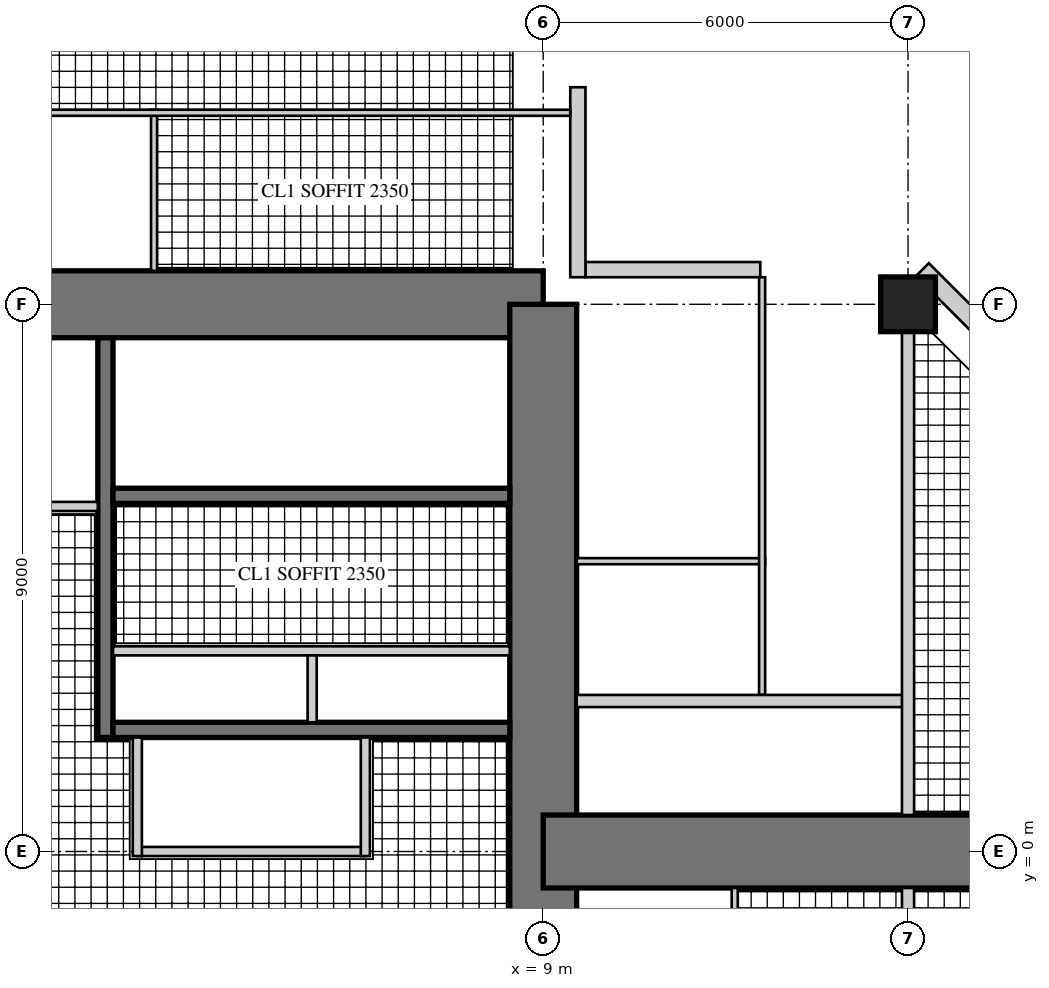
"""IFC4 building model, lengths in metres.
Left out: names, types, materials, properties, quantities, classifications, styles, units other than length and angle.
Written with IfcOpenShell. Run it as: python <this file> out.ifc"""

import sys

from ifc_helpers import new_model, si_unit, direction, frame, frame_2d, origin, origin_2d, place, context, subcontext, project, spatial, rectangle, hollow_rectangle, extrude, element, fill, save


model = new_model("IFC4")
c1 = context("Model", 3, precision=1e-05, world=origin(), true_north=direction((0.0, 1.0)))
c2 = subcontext(c1, "Body", "Model", "MODEL_VIEW")
j1 = project(units=[si_unit("LENGTHUNIT", "METRE"), si_unit("PLANEANGLEUNIT", "RADIAN")], contexts=[c1])
p1 = place(None, origin())
s1 = spatial("IfcSite", under=j1, at=p1, CompositionType="ELEMENT")
p2 = place(p1, origin())
s2 = spatial("IfcBuilding", under=s1, at=p2, CompositionType="ELEMENT")
p3 = place(p2, frame((0.0, 0.0, 179.7)))
s3 = spatial("IfcBuildingStorey", under=s2, at=p3, CompositionType="ELEMENT", Elevation=179.7)
p4 = place(p3, frame((9.0, 9.0, 0.0), z_axis=(0.0, 0.0, 1.0), x_axis=(-1.0, 0.0, 0.0)))
e1 = element("IfcWall", 1, at=p4, inside=s3, PredefinedType="SHEAR", context=c2, shape_type="SweptSolid", body=[
    extrude(rectangle(XDim=18.0, YDim=1.1, at=frame_2d((9.0, 0.0))), origin(), (0.0, 0.0, 1.0), 3.4),
])
p5 = place(p4, frame((9.8, 0.0, 0.0)))
e2 = element("IfcOpeningElement", 2, at=p5, cuts=e1, PredefinedType="OPENING", context=c2, shape_type="SweptSolid", body=[
    extrude(rectangle(XDim=1.0, YDim=2.4, at=frame_2d((0.5, 1.2))), frame((0.0, 0.56, 0.0), z_axis=(0.0, -1.0, 0.0), x_axis=(1.0, 0.0, 0.0)), (0.0, 0.0, 1.0), 1.12),
])
p6 = place(p3, frame((9.0, -9.0, 0.0), z_axis=(0.0, 0.0, 1.0), x_axis=(0.0, 1.0, 0.0)))
e3 = element("IfcWall", 3, at=p6, inside=s3, PredefinedType="SHEAR", context=c2, shape_type="SweptSolid", body=[
    extrude(rectangle(XDim=18.0, YDim=1.1, at=frame_2d((9.0, 0.0))), origin(), (0.0, 0.0, 1.0), 3.4),
])
p7 = place(p6, frame((9.8, 0.0, 0.0)))
e4 = element("IfcOpeningElement", 4, at=p7, cuts=e3, PredefinedType="OPENING", context=c2, shape_type="SweptSolid", body=[
    extrude(rectangle(XDim=1.0, YDim=2.4, at=frame_2d((0.5, 1.2))), frame((0.0, 0.56, 0.0), z_axis=(0.0, -1.0, 0.0), x_axis=(1.0, 0.0, 0.0)), (0.0, 0.0, 1.0), 1.12),
])
p8 = place(p3, frame((1.8, 1.875, 0.0), z_axis=(0.0, 0.0, 1.0), x_axis=(0.0, 1.0, 0.0)))
e5 = element("IfcWall", 5, at=p8, inside=s3, PredefinedType="SHEAR", context=c2, shape_type="SweptSolid", body=[
    extrude(rectangle(XDim=6.575, YDim=0.25, at=frame_2d((3.288, 0.0))), origin(), (0.0, 0.0, 1.0), 3.4),
])
p9 = place(p8, frame((1.875, 0.0, 0.0)))
e6 = element("IfcOpeningElement", 6, at=p9, cuts=e5, PredefinedType="OPENING", context=c2, shape_type="SweptSolid", body=[
    extrude(rectangle(XDim=1.6, YDim=2.4, at=frame_2d((0.8, 1.2))), frame((0.0, 0.135, 0.0), z_axis=(0.0, -1.0, 0.0), x_axis=(1.0, 0.0, 0.0)), (0.0, 0.0, 1.0), 0.27),
])
p10 = place(p3, frame((1.925, 2.0, 0.0), z_axis=(0.0, 0.0, 1.0), x_axis=(1.0, 0.0, 0.0)))
e7 = element("IfcWall", 7, at=p10, inside=s3, PredefinedType="SHEAR", context=c2, shape_type="SweptSolid", body=[
    extrude(rectangle(XDim=6.525, YDim=0.25, at=frame_2d((3.262, 0.0))), origin(), (0.0, 0.0, 1.0), 3.4),
])
p11 = place(p3, frame((1.925, 5.85, 0.0), z_axis=(0.0, 0.0, 1.0), x_axis=(1.0, 0.0, 0.0)))
e8 = element("IfcWall", 8, at=p11, inside=s3, PredefinedType="SHEAR", context=c2, shape_type="SweptSolid", body=[
    extrude(rectangle(XDim=6.525, YDim=0.25, at=frame_2d((3.262, 0.0))), origin(), (0.0, 0.0, 1.0), 3.4),
])
p12 = place(p11, frame((0.521, 0.0, 0.0)))
e9 = element("IfcOpeningElement", 9, at=p12, cuts=e8, PredefinedType="OPENING", context=c2, shape_type="SweptSolid", body=[
    extrude(rectangle(XDim=1.0, YDim=2.1, at=frame_2d((0.5, 1.05))), frame((0.0, 0.135, 0.0), z_axis=(0.0, -1.0, 0.0), x_axis=(1.0, 0.0, 0.0)), (0.0, 0.0, 1.0), 0.27),
])
p13 = place(p3, frame((1.925, 3.3, 0.0), z_axis=(0.0, 0.0, 1.0), x_axis=(1.0, 0.0, 0.0)))
e10 = element("IfcWall", 10, at=p13, inside=s3, PredefinedType="PARTITIONING", context=c2, shape_type="SweptSolid", body=[
    extrude(rectangle(XDim=6.525, YDim=0.15, at=frame_2d((3.262, 0.0))), origin(), (0.0, 0.0, 1.0), 3.4),
])
p14 = place(p13, frame((0.075, 0.0, 0.0)))
e11 = element("IfcOpeningElement", 11, at=p14, cuts=e10, PredefinedType="OPENING", context=c2, shape_type="SweptSolid", body=[
    extrude(rectangle(XDim=0.8, YDim=2.1, at=frame_2d((0.4, 1.05))), frame((0.0, 0.085, 0.0), z_axis=(0.0, -1.0, 0.0), x_axis=(1.0, 0.0, 0.0)), (0.0, 0.0, 1.0), 0.17),
])
p15 = place(p13, frame((3.675, 0.0, 0.0)))
e12 = element("IfcOpeningElement", 12, at=p15, cuts=e10, PredefinedType="OPENING", context=c2, shape_type="SweptSolid", body=[
    extrude(rectangle(XDim=0.8, YDim=2.1, at=frame_2d((0.4, 1.05))), frame((0.0, 0.085, 0.0), z_axis=(0.0, -1.0, 0.0), x_axis=(1.0, 0.0, 0.0)), (0.0, 0.0, 1.0), 0.17),
])
p16 = place(p3, frame((5.2, 2.125, 0.0), z_axis=(0.0, 0.0, 1.0), x_axis=(0.0, 1.0, 0.0)))
e13 = element("IfcWall", 13, at=p16, inside=s3, PredefinedType="PARTITIONING", context=c2, shape_type="SweptSolid", body=[
    extrude(rectangle(XDim=1.1, YDim=0.15, at=frame_2d((0.55, 0.0))), origin(), (0.0, 0.0, 1.0), 3.4),
])
p17 = place(p3, frame((9.0, 0.0, 0.0), z_axis=(0.0, 0.0, 1.0), x_axis=(1.0, 0.0, 0.0)))
e14 = element("IfcWall", 14, at=p17, inside=s3, PredefinedType="SHEAR", context=c2, shape_type="SweptSolid", body=[
    extrude(rectangle(XDim=9.0, YDim=1.2, at=frame_2d((4.5, 0.0))), origin(), (0.0, 0.0, 1.0), 3.4),
])
p18 = place(p17, frame((3.95, 0.0, 0.0)))
e15 = element("IfcOpeningElement", 15, at=p18, cuts=e14, PredefinedType="OPENING", context=c2, shape_type="SweptSolid", body=[
    extrude(rectangle(XDim=1.0, YDim=2.15, at=frame_2d((0.5, 1.075))), frame((0.0, 0.61, 0.0), z_axis=(0.0, -1.0, 0.0), x_axis=(1.0, 0.0, 0.0)), (0.0, 0.0, 1.0), 1.22),
])
p19 = place(p17, frame((7.0, 0.0, 0.0)))
e16 = element("IfcOpeningElement", 16, at=p19, cuts=e14, PredefinedType="OPENING", context=c2, shape_type="SweptSolid", body=[
    extrude(rectangle(XDim=1.0, YDim=2.2, at=frame_2d((0.5, 1.1))), frame((0.0, 0.61, 0.0), z_axis=(0.0, -1.0, 0.0), x_axis=(1.0, 0.0, 0.0)), (0.0, 0.0, 1.0), 1.22),
])
p20 = place(p3, frame((15.0, 9.0, 0.0), z_axis=(0.0, 0.0, 1.0), x_axis=(1.0, 0.0, 0.0)))
e17 = element("IfcColumn", 17, at=p20, inside=s3, PredefinedType="COLUMN", context=c2, shape_type="SweptSolid", body=[
    extrude(rectangle(XDim=0.9, YDim=0.9, at=origin_2d()), origin(), (0.0, 0.0, 1.0), 3.4),
])
p21 = place(p3, frame((18.57, 6.236, 0.0), z_axis=(0.0, 0.0, 1.0), x_axis=(-0.707106781187, 0.707106781187, 0.0)))
e18 = element("IfcWall", 18, at=p21, inside=s3, PredefinedType="SOLIDWALL", context=c2, shape_type="SweptSolid", body=[
    extrude(rectangle(XDim=4.715, YDim=0.3, at=frame_2d((2.357, 0.0))), origin(), (0.0, 0.0, 1.0), 3.22),
])
p22 = place(p21, frame((1.907, 0.0, 0.3)))
e19 = element("IfcOpeningElement", 19, at=p22, cuts=e18, PredefinedType="OPENING", context=c2, shape_type="SweptSolid", body=[
    extrude(rectangle(XDim=0.9, YDim=2.4, at=frame_2d((0.45, 1.2))), frame((0.0, 0.16, 0.0), z_axis=(0.0, -1.0, 0.0), x_axis=(1.0, 0.0, 0.0)), (0.0, 0.0, 1.0), 0.32),
])
p23 = place(p3, frame((12.57, 9.57, 0.0), z_axis=(0.0, 0.0, 1.0), x_axis=(-1.0, 0.0, 0.0)))
e20 = element("IfcWall", 20, at=p23, inside=s3, PredefinedType="SOLIDWALL", context=c2, shape_type="SweptSolid", body=[
    extrude(rectangle(XDim=2.875, YDim=0.25, at=frame_2d((1.438, 0.0))), origin(), (0.0, 0.0, 1.0), 3.22),
])
p24 = place(p23, frame((0.6, 0.0, 0.0)))
e21 = element("IfcOpeningElement", 21, at=p24, cuts=e20, PredefinedType="OPENING", context=c2, shape_type="SweptSolid", body=[
    extrude(rectangle(XDim=1.0, YDim=2.2, at=frame_2d((0.5, 1.1))), frame((0.0, 0.135, 0.0), z_axis=(0.0, -1.0, 0.0), x_axis=(1.0, 0.0, 0.0)), (0.0, 0.0, 1.0), 0.27),
])
p25 = place(p3, frame((9.57, 9.445, 0.0), z_axis=(0.0, 0.0, 1.0), x_axis=(0.0, 1.0, 0.0)))
e22 = element("IfcWall", 22, at=p25, inside=s3, PredefinedType="SOLIDWALL", context=c2, shape_type="SweptSolid", body=[
    extrude(rectangle(XDim=3.125, YDim=0.25, at=frame_2d((1.562, 0.0))), origin(), (0.0, 0.0, 1.0), 3.22),
])
p26 = place(p25, frame((0.6, 0.0, 0.0)))
e23 = element("IfcOpeningElement", 23, at=p26, cuts=e22, PredefinedType="OPENING", context=c2, shape_type="SweptSolid", body=[
    extrude(rectangle(XDim=1.0, YDim=2.2, at=frame_2d((0.5, 1.1))), frame((0.0, 0.135, 0.0), z_axis=(0.0, -1.0, 0.0), x_axis=(1.0, 0.0, 0.0)), (0.0, 0.0, 1.0), 0.27),
])
p27 = place(p3, frame((2.325, 0.0, 0.0), z_axis=(0.0, 0.0, 1.0), x_axis=(1.0, 0.0, 0.0)))
e24 = element("IfcWall", 24, at=p27, inside=s3, PredefinedType="PARTITIONING", context=c2, shape_type="SweptSolid", body=[
    extrude(rectangle(XDim=3.75, YDim=0.15, at=frame_2d((1.875, 0.0))), origin(), (0.0, 0.0, 1.0), 3.22),
])
p28 = place(p27, frame((0.4, 0.0, 0.0)))
e25 = element("IfcOpeningElement", 25, at=p28, cuts=e24, PredefinedType="OPENING", context=c2, shape_type="SweptSolid", body=[
    extrude(rectangle(XDim=1.0, YDim=2.1, at=frame_2d((0.5, 1.05))), frame((0.0, 0.085, 0.0), z_axis=(0.0, -1.0, 0.0), x_axis=(1.0, 0.0, 0.0)), (0.0, 0.0, 1.0), 0.17),
])
for number, where, z_axis, x_axis in (
    (26, (2.325, 1.875, 0.0), (0.0, 0.0, 1.0), (0.0, -1.0, 0.0)),
    (27, (6.075, -0.075, 0.0), (0.0, 0.0, 1.0), (0.0, 1.0, 0.0)),
):
    element("IfcWall", number, at=place(p3, frame(where, z_axis=z_axis, x_axis=x_axis)), inside=s3, PredefinedType="PARTITIONING", context=c2, shape_type="SweptSolid", body=[
        extrude(rectangle(XDim=1.95, YDim=0.15, at=frame_2d((0.975, 0.0))), origin(), (0.0, 0.0, 1.0), 3.22),
    ])
p29 = place(p3, frame((1.675, 5.675, 0.0), z_axis=(0.0, 0.0, 1.0), x_axis=(-1.0, 0.0, 0.0)))
e28 = element("IfcWall", 28, at=p29, inside=s3, PredefinedType="PARTITIONING", context=c2, shape_type="SweptSolid", body=[
    extrude(rectangle(XDim=1.75, YDim=0.15, at=frame_2d((0.875, 0.0))), origin(), (0.0, 0.0, 1.0), 3.22),
])
p30 = place(p3, frame((2.6, 9.55, 0.0), z_axis=(0.0, 0.0, 1.0), x_axis=(0.0, 1.0, 0.0)))
e29 = element("IfcWall", 29, at=p30, inside=s3, PredefinedType="PARTITIONING", context=c2, shape_type="SweptSolid", body=[
    extrude(rectangle(XDim=2.65, YDim=0.1, at=frame_2d((1.325, 0.0))), origin(), (0.0, 0.0, 1.0), 3.22),
])
p31 = place(p3, frame((9.445, 12.15, 0.0), z_axis=(0.0, 0.0, 1.0), x_axis=(-1.0, 0.0, 0.0)))
e30 = element("IfcWall", 30, at=p31, inside=s3, PredefinedType="PARTITIONING", context=c2, shape_type="SweptSolid", body=[
    extrude(rectangle(XDim=9.045, YDim=0.1, at=frame_2d((4.522, 0.0))), origin(), (0.0, 0.0, 1.0), 3.22),
])
p32 = place(p31, frame((5.495, 0.0, 0.0)))
e31 = element("IfcOpeningElement", 31, at=p32, cuts=e30, PredefinedType="OPENING", context=c2, shape_type="SweptSolid", body=[
    extrude(rectangle(XDim=0.9, YDim=2.1, at=frame_2d((0.45, 1.05))), frame((0.0, 0.06, 0.0), z_axis=(0.0, -1.0, 0.0), x_axis=(1.0, 0.0, 0.0)), (0.0, 0.0, 1.0), 0.12),
])
p33 = place(p31, frame((7.595, 0.0, 0.0)))
e32 = element("IfcOpeningElement", 32, at=p33, cuts=e30, PredefinedType="OPENING", context=c2, shape_type="SweptSolid", body=[
    extrude(rectangle(XDim=0.9, YDim=2.1, at=frame_2d((0.45, 1.05))), frame((0.0, 0.06, 0.0), z_axis=(0.0, -1.0, 0.0), x_axis=(1.0, 0.0, 0.0)), (0.0, 0.0, 1.0), 0.12),
])
p34 = place(p3, frame((9.55, 4.775, 0.0), z_axis=(0.0, 0.0, 1.0), x_axis=(1.0, 0.0, 0.0)))
e33 = element("IfcWall", 33, at=p34, inside=s3, PredefinedType="PARTITIONING", context=c2, shape_type="SweptSolid", body=[
    extrude(rectangle(XDim=3.1, YDim=0.1, at=frame_2d((1.55, 0.0))), origin(), (0.0, 0.0, 1.0), 3.22),
])
p35 = place(p3, frame((12.6, 2.575, 0.0), z_axis=(0.0, 0.0, 1.0), x_axis=(0.0, 1.0, 0.0)))
e34 = element("IfcWall", 34, at=p35, inside=s3, PredefinedType="PARTITIONING", context=c2, shape_type="SweptSolid", body=[
    extrude(rectangle(XDim=6.87, YDim=0.1, at=frame_2d((3.435, 0.0))), origin(), (0.0, 0.0, 1.0), 3.22),
])
p36 = place(p35, frame((0.55, 0.0, 0.0)))
e35 = element("IfcOpeningElement", 35, at=p36, cuts=e34, PredefinedType="OPENING", context=c2, shape_type="SweptSolid", body=[
    extrude(rectangle(XDim=0.9, YDim=2.1, at=frame_2d((0.45, 1.05))), frame((0.0, 0.06, 0.0), z_axis=(0.0, -1.0, 0.0), x_axis=(1.0, 0.0, 0.0)), (0.0, 0.0, 1.0), 0.12),
])
p37 = place(p35, frame((2.65, 0.0, 0.0)))
e36 = element("IfcOpeningElement", 36, at=p37, cuts=e34, PredefinedType="OPENING", context=c2, shape_type="SweptSolid", body=[
    extrude(rectangle(XDim=0.9, YDim=2.1, at=frame_2d((0.45, 1.05))), frame((0.0, 0.06, 0.0), z_axis=(0.0, -1.0, 0.0), x_axis=(1.0, 0.0, 0.0)), (0.0, 0.0, 1.0), 0.12),
])
p38 = place(p3, frame((12.15, -9.445, 0.0), z_axis=(0.0, 0.0, 1.0), x_axis=(0.0, 1.0, 0.0)))
e37 = element("IfcWall", 37, at=p38, inside=s3, PredefinedType="PARTITIONING", context=c2, shape_type="SweptSolid", body=[
    extrude(rectangle(XDim=8.845, YDim=0.1, at=frame_2d((4.422, 0.0))), origin(), (0.0, 0.0, 1.0), 3.22),
])
p39 = place(p38, frame((5.295, 0.0, 0.0)))
e38 = element("IfcOpeningElement", 38, at=p39, cuts=e37, PredefinedType="OPENING", context=c2, shape_type="SweptSolid", body=[
    extrude(rectangle(XDim=0.9, YDim=2.1, at=frame_2d((0.45, 1.05))), frame((0.0, 0.06, 0.0), z_axis=(0.0, -1.0, 0.0), x_axis=(1.0, 0.0, 0.0)), (0.0, 0.0, 1.0), 0.12),
])
p40 = place(p38, frame((7.395, 0.0, 0.0)))
e39 = element("IfcOpeningElement", 39, at=p40, cuts=e37, PredefinedType="OPENING", context=c2, shape_type="SweptSolid", body=[
    extrude(rectangle(XDim=0.9, YDim=2.1, at=frame_2d((0.45, 1.05))), frame((0.0, 0.06, 0.0), z_axis=(0.0, -1.0, 0.0), x_axis=(1.0, 0.0, 0.0)), (0.0, 0.0, 1.0), 0.12),
])
p41 = place(p3, frame((9.55, 2.475, 0.0), z_axis=(0.0, 0.0, 1.0), x_axis=(1.0, 0.0, 0.0)))
e40 = element("IfcWall", 40, at=p41, inside=s3, PredefinedType="SOLIDWALL", context=c2, shape_type="SweptSolid", body=[
    extrude(rectangle(XDim=5.45, YDim=0.2, at=frame_2d((2.725, 0.0))), origin(), (0.0, 0.0, 1.0), 3.22),
])
p42 = place(p41, frame((3.6, 0.0, 0.0)))
e41 = element("IfcOpeningElement", 41, at=p42, cuts=e40, PredefinedType="OPENING", context=c2, shape_type="SweptSolid", body=[
    extrude(rectangle(XDim=1.0, YDim=2.15, at=frame_2d((0.5, 1.075))), frame((0.0, 0.11, 0.0), z_axis=(0.0, -1.0, 0.0), x_axis=(1.0, 0.0, 0.0)), (0.0, 0.0, 1.0), 0.22),
])
p43 = place(p3, frame((15.0, -8.55, 0.0), z_axis=(0.0, 0.0, 1.0), x_axis=(0.0, 1.0, 0.0)))
e42 = element("IfcWall", 42, at=p43, inside=s3, PredefinedType="SOLIDWALL", context=c2, shape_type="SweptSolid", body=[
    extrude(rectangle(XDim=7.95, YDim=0.2, at=frame_2d((3.975, 0.0))), origin(), (0.0, 0.0, 1.0), 2.47),
])
p44 = place(p3, frame((15.0, 0.6, 0.0), z_axis=(0.0, 0.0, 1.0), x_axis=(0.0, 1.0, 0.0)))
e43 = element("IfcWall", 43, at=p44, inside=s3, PredefinedType="SOLIDWALL", context=c2, shape_type="SweptSolid", body=[
    extrude(rectangle(XDim=7.95, YDim=0.2, at=frame_2d((3.975, 0.0))), origin(), (0.0, 0.0, 1.0), 2.47),
])
p45 = place(p44, frame((0.35, 0.0, 0.0)))
e44 = element("IfcOpeningElement", 44, at=p45, cuts=e43, PredefinedType="OPENING", context=c2, shape_type="SweptSolid", body=[
    extrude(rectangle(XDim=1.0, YDim=2.2, at=frame_2d((0.5, 1.1))), frame((0.0, 0.11, 0.0), z_axis=(0.0, -1.0, 0.0), x_axis=(1.0, 0.0, 0.0)), (0.0, 0.0, 1.0), 0.22),
])
p46 = place(p24, origin())
e45 = element("IfcDoor", 45, at=p46, inside=s3, OperationType="SINGLE_SWING_LEFT", PredefinedType="DOOR", context=c2, shape_type="SweptSolid", body=[
    extrude(hollow_rectangle(XDim=1.0, YDim=2.2, WallThickness=0.06, at=frame_2d((0.5, 1.1))), frame((0.0, 0.025, 0.0), z_axis=(0.0, -1.0, 0.0), x_axis=(1.0, 0.0, 0.0)), (0.0, 0.0, 1.0), 0.05),
    extrude(rectangle(XDim=0.879, YDim=2.079, at=frame_2d((0.5, 1.1))), frame((0.0, 0.025, 0.0), z_axis=(0.0, -1.0, 0.0), x_axis=(1.0, 0.0, 0.0)), (0.0, 0.0, 1.0), 0.05),
])
fill(e21, e45)
p47 = place(p26, origin())
e46 = element("IfcDoor", 46, at=p47, inside=s3, OperationType="SINGLE_SWING_LEFT", PredefinedType="DOOR", context=c2, shape_type="SweptSolid", body=[
    extrude(hollow_rectangle(XDim=1.0, YDim=2.2, WallThickness=0.06, at=frame_2d((0.5, 1.1))), frame((0.0, 0.025, 0.0), z_axis=(0.0, -1.0, 0.0), x_axis=(1.0, 0.0, 0.0)), (0.0, 0.0, 1.0), 0.05),
    extrude(rectangle(XDim=0.879, YDim=2.079, at=frame_2d((0.5, 1.1))), frame((0.0, 0.025, 0.0), z_axis=(0.0, -1.0, 0.0), x_axis=(1.0, 0.0, 0.0)), (0.0, 0.0, 1.0), 0.05),
])
fill(e23, e46)
p48 = place(p28, origin())
e47 = element("IfcDoor", 47, at=p48, inside=s3, OperationType="SINGLE_SWING_LEFT", PredefinedType="DOOR", context=c2, shape_type="SweptSolid", body=[
    extrude(rectangle(XDim=1.0, YDim=2.1, at=frame_2d((0.5, 1.05))), frame((0.0, 0.025, 0.0), z_axis=(0.0, -1.0, 0.0), x_axis=(1.0, 0.0, 0.0)), (0.0, 0.0, 1.0), 0.05),
])
fill(e25, e47)
p49 = place(p32, origin())
e48 = element("IfcDoor", 48, at=p49, inside=s3, OperationType="SINGLE_SWING_RIGHT", PredefinedType="DOOR", context=c2, shape_type="SweptSolid", body=[
    extrude(rectangle(XDim=0.9, YDim=2.1, at=frame_2d((0.45, 1.05))), frame((0.0, 0.025, 0.0), z_axis=(0.0, -1.0, 0.0), x_axis=(1.0, 0.0, 0.0)), (0.0, 0.0, 1.0), 0.05),
])
fill(e31, e48)
p50 = place(p33, origin())
e49 = element("IfcDoor", 49, at=p50, inside=s3, OperationType="SINGLE_SWING_RIGHT", PredefinedType="DOOR", context=c2, shape_type="SweptSolid", body=[
    extrude(rectangle(XDim=0.9, YDim=2.1, at=frame_2d((0.45, 1.05))), frame((0.0, 0.025, 0.0), z_axis=(0.0, -1.0, 0.0), x_axis=(1.0, 0.0, 0.0)), (0.0, 0.0, 1.0), 0.05),
])
fill(e32, e49)
p51 = place(p36, origin())
e50 = element("IfcDoor", 50, at=p51, inside=s3, OperationType="SINGLE_SWING_LEFT", PredefinedType="DOOR", context=c2, shape_type="SweptSolid", body=[
    extrude(rectangle(XDim=0.9, YDim=2.1, at=frame_2d((0.45, 1.05))), frame((0.0, 0.025, 0.0), z_axis=(0.0, -1.0, 0.0), x_axis=(1.0, 0.0, 0.0)), (0.0, 0.0, 1.0), 0.05),
])
fill(e35, e50)
p52 = place(p37, origin())
e51 = element("IfcDoor", 51, at=p52, inside=s3, OperationType="SINGLE_SWING_LEFT", PredefinedType="DOOR", context=c2, shape_type="SweptSolid", body=[
    extrude(rectangle(XDim=0.9, YDim=2.1, at=frame_2d((0.45, 1.05))), frame((0.0, 0.025, 0.0), z_axis=(0.0, -1.0, 0.0), x_axis=(1.0, 0.0, 0.0)), (0.0, 0.0, 1.0), 0.05),
])
fill(e36, e51)
p53 = place(p42, origin())
e52 = element("IfcDoor", 52, at=p53, inside=s3, OperationType="SINGLE_SWING_LEFT", PredefinedType="DOOR", context=c2, shape_type="SweptSolid", body=[
    extrude(rectangle(XDim=1.0, YDim=2.15, at=frame_2d((0.5, 1.075))), frame((0.0, 0.025, 0.0), z_axis=(0.0, -1.0, 0.0), x_axis=(1.0, 0.0, 0.0)), (0.0, 0.0, 1.0), 0.05),
])
fill(e41, e52)
p54 = place(p45, frame((1.0, 0.0, 0.0), z_axis=(0.0, 0.0, 1.0), x_axis=(-1.0, 0.0, 0.0)))
e53 = element("IfcDoor", 53, at=p54, inside=s3, OperationType="SINGLE_SWING_LEFT", PredefinedType="DOOR", context=c2, shape_type="SweptSolid", body=[
    extrude(rectangle(XDim=1.0, YDim=2.2, at=frame_2d((0.5, 1.1))), frame((0.0, 0.025, 0.0), z_axis=(0.0, -1.0, 0.0), x_axis=(1.0, 0.0, 0.0)), (0.0, 0.0, 1.0), 0.05),
])
fill(e44, e53)
p55 = place(p18, frame((1.0, 0.0, 0.0), z_axis=(0.0, 0.0, 1.0), x_axis=(-1.0, 0.0, 0.0)))
e54 = element("IfcDoor", 54, at=p55, inside=s3, OperationType="SINGLE_SWING_RIGHT", PredefinedType="DOOR", context=c2, shape_type="SweptSolid", body=[
    extrude(rectangle(XDim=1.0, YDim=2.15, at=frame_2d((0.5, 1.075))), frame((0.0, 0.025, 0.0), z_axis=(0.0, -1.0, 0.0), x_axis=(1.0, 0.0, 0.0)), (0.0, 0.0, 1.0), 0.05),
])
fill(e15, e54)
p56 = place(p7, origin())
e55 = element("IfcDoor", 55, at=p56, inside=s3, OperationType="SINGLE_SWING_RIGHT", PredefinedType="DOOR", context=c2, shape_type="SweptSolid", body=[
    extrude(rectangle(XDim=1.0, YDim=2.4, at=frame_2d((0.5, 1.2))), frame((0.0, 0.055, 0.0), z_axis=(0.0, -1.0, 0.0), x_axis=(1.0, 0.0, 0.0)), (0.0, 0.0, 1.0), 0.05),
])
fill(e4, e55)
p57 = place(p9, frame((1.6, 0.0, 0.0), z_axis=(0.0, 0.0, 1.0), x_axis=(-1.0, 0.0, 0.0)))
e56 = element("IfcDoor", 56, at=p57, inside=s3, OperationType="DOUBLE_DOOR_SINGLE_SWING", PredefinedType="DOOR", context=c2, shape_type="SweptSolid", body=[
    extrude(rectangle(XDim=1.6, YDim=2.4, at=frame_2d((0.8, 1.2))), frame((0.0, 0.025, 0.0), z_axis=(0.0, -1.0, 0.0), x_axis=(1.0, 0.0, 0.0)), (0.0, 0.0, 1.0), 0.05),
])
fill(e6, e56)
p58 = place(p14, frame((0.8, 0.0, 0.0), z_axis=(0.0, 0.0, 1.0), x_axis=(-1.0, 0.0, 0.0)))
e57 = element("IfcDoor", 57, at=p58, inside=s3, OperationType="SINGLE_SWING_RIGHT", PredefinedType="DOOR", context=c2, shape_type="SweptSolid", body=[
    extrude(rectangle(XDim=0.8, YDim=2.1, at=frame_2d((0.4, 1.05))), frame((0.0, 0.025, 0.0), z_axis=(0.0, -1.0, 0.0), x_axis=(1.0, 0.0, 0.0)), (0.0, 0.0, 1.0), 0.05),
])
fill(e11, e57)
p59 = place(p15, frame((0.8, 0.0, 0.0), z_axis=(0.0, 0.0, 1.0), x_axis=(-1.0, 0.0, 0.0)))
e58 = element("IfcDoor", 58, at=p59, inside=s3, OperationType="SINGLE_SWING_RIGHT", PredefinedType="DOOR", context=c2, shape_type="SweptSolid", body=[
    extrude(rectangle(XDim=0.8, YDim=2.1, at=frame_2d((0.4, 1.05))), frame((0.0, 0.025, 0.0), z_axis=(0.0, -1.0, 0.0), x_axis=(1.0, 0.0, 0.0)), (0.0, 0.0, 1.0), 0.05),
])
fill(e12, e58)
p60 = place(p12, origin())
e59 = element("IfcDoor", 59, at=p60, inside=s3, OperationType="SINGLE_SWING_LEFT", PredefinedType="DOOR", context=c2, shape_type="SweptSolid", body=[
    extrude(rectangle(XDim=1.0, YDim=2.1, at=frame_2d((0.5, 1.05))), frame((0.0, 0.025, 0.0), z_axis=(0.0, -1.0, 0.0), x_axis=(1.0, 0.0, 0.0)), (0.0, 0.0, 1.0), 0.05),
])
fill(e9, e59)
save(model, sys.argv[1])
